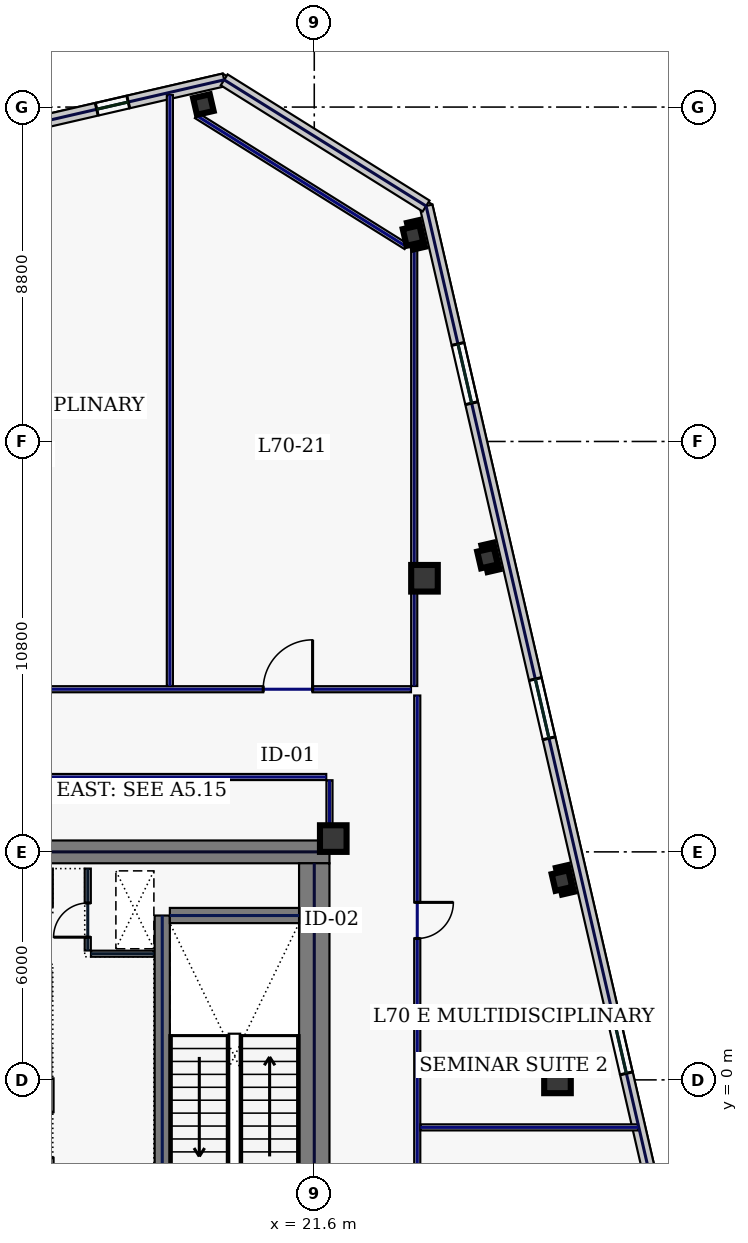
"""IFC4 building model, lengths in metres.
Left out: names, types, materials, properties, quantities, classifications, styles, units other than length and angle.
Written with IfcOpenShell. Run it as: python <this file> out.ifc"""

import sys

from ifc_helpers import new_model, si_unit, direction, frame, frame_2d, origin, origin_2d, place, context, subcontext, project, spatial, rectangle, hollow_rectangle, extrude, element, fill, save


model = new_model("IFC4")
c1 = context("Model", 3, precision=1e-05, world=origin(), true_north=direction((0.0, 1.0)))
c2 = subcontext(c1, "Body", "Model", "MODEL_VIEW")
j1 = project(units=[si_unit("LENGTHUNIT", "METRE"), si_unit("PLANEANGLEUNIT", "RADIAN")], contexts=[c1])
p1 = place(None, origin())
s1 = spatial("IfcSite", under=j1, at=p1, CompositionType="ELEMENT")
p2 = place(p1, origin())
s2 = spatial("IfcBuilding", under=s1, at=p2, CompositionType="ELEMENT")
p3 = place(p2, frame((0.0, 0.0, 301.0)))
s3 = spatial("IfcBuildingStorey", under=s2, at=p3, CompositionType="ELEMENT", Elevation=301.0)
p4 = place(p3, frame((10.5, 6.0, 0.0), z_axis=(0.0, 0.0, 1.0), x_axis=(1.0, 0.0, 0.0)))
e1 = element("IfcWall", 1, at=p4, inside=s3, PredefinedType="SHEAR", context=c2, shape_type="SweptSolid", body=[
    extrude(rectangle(XDim=11.5, YDim=0.6, at=frame_2d((5.75, 0.0))), origin(), (0.0, 0.0, 1.0), 3.74),
])
p5 = place(p3, frame((21.6, -5.7, 0.0), z_axis=(0.0, 0.0, 1.0), x_axis=(0.0, 1.0, 0.0)))
e2 = element("IfcWall", 2, at=p5, inside=s3, PredefinedType="SHEAR", context=c2, shape_type="SweptSolid", body=[
    extrude(rectangle(XDim=11.4, YDim=0.8, at=frame_2d((5.7, 0.0))), origin(), (0.0, 0.0, 1.0), 3.74),
])
p6 = place(p3, frame((17.6, -4.325, 0.0), z_axis=(0.0, 0.0, 1.0), x_axis=(0.0, 1.0, 0.0)))
e3 = element("IfcWall", 3, at=p6, inside=s3, PredefinedType="SHEAR", context=c2, shape_type="SweptSolid", body=[
    extrude(rectangle(XDim=8.65, YDim=0.4, at=frame_2d((4.325, 0.0))), origin(), (0.0, 0.0, 1.0), 3.74),
])
p7 = place(p6, frame((0.25, 0.0, 0.0)))
e4 = element("IfcOpeningElement", 4, at=p7, cuts=e3, PredefinedType="OPENING", context=c2, shape_type="SweptSolid", body=[
    extrude(rectangle(XDim=1.1, YDim=2.2, at=frame_2d((0.55, 1.1))), frame((0.0, 0.21, 0.0), z_axis=(0.0, -1.0, 0.0), x_axis=(1.0, 0.0, 0.0)), (0.0, 0.0, 1.0), 0.42),
])
p8 = place(p3, frame((17.8, 4.325, 0.0), z_axis=(0.0, 0.0, 1.0), x_axis=(1.0, 0.0, 0.0)))
e5 = element("IfcWall", 5, at=p8, inside=s3, PredefinedType="SHEAR", context=c2, shape_type="SweptSolid", body=[
    extrude(rectangle(XDim=3.4, YDim=0.4, at=frame_2d((1.7, 0.0))), origin(), (0.0, 0.0, 1.0), 3.74),
])
for number, where, z_axis, x_axis in (
    (6, (22.1, 6.35, 0.0), (0.0, 0.0, 1.0), (1.0, 0.0, 0.0)),
    (7, (24.5, 13.2, 0.0), (0.0, 0.0, 1.0), (1.0, 0.0, 0.0)),
    (8, (28.0, 0.0, 0.0), (0.0, 0.0, 1.0), (1.0, 0.0, 0.0)),
):
    element("IfcColumn", number, at=place(p3, frame(where, z_axis=z_axis, x_axis=x_axis)), inside=s3, PredefinedType="COLUMN", context=c2, shape_type="SweptSolid", body=[
        extrude(hollow_rectangle(XDim=0.7, YDim=0.7, WallThickness=0.032, at=origin_2d()), origin(), (0.0, 0.0, 1.0), 3.74),
    ])
for number, where, z_axis, x_axis in (
    (9, (18.682, 25.666, 0.0), (0.0, 0.0, 1.0), (0.974, 0.225, 0.0)),
    (10, (28.117, 5.246, 0.0), (0.0, 0.0, 1.0), (0.974, 0.225, 0.0)),
    (11, (26.158, 13.732, 0.0), (0.0, 0.0, 1.0), (0.974, 0.225, 0.0)),
    (12, (24.198, 22.219, 0.0), (0.0, 0.0, 1.0), (0.974, 0.225, 0.0)),
):
    element("IfcColumn", number, at=place(p3, frame(where, z_axis=z_axis, x_axis=x_axis)), inside=s3, PredefinedType="COLUMN", context=c2, shape_type="SweptSolid", body=[
        extrude(hollow_rectangle(XDim=0.45, YDim=0.45, WallThickness=0.022, at=origin_2d()), origin(), (0.0, 0.0, 1.0), 3.74),
    ])
p9 = place(p3, frame((19.229, 26.316, 0.0), z_axis=(0.0, 0.0, 1.0), x_axis=(-0.974372473594, -0.224940620392, 0.0)))
e13 = element("IfcWall", 13, at=p9, inside=s3, PredefinedType="STANDARD", context=c2, shape_type="SweptSolid", body=[
    extrude(rectangle(XDim=17.366, YDim=0.34, at=frame_2d((8.683, 0.0))), origin(), (0.0, 0.0, 1.0), 3.74),
])
p10 = place(p9, frame((13.187, 0.0, 1.0)))
e14 = element("IfcOpeningElement", 14, at=p10, cuts=e13, PredefinedType="OPENING", context=c2, shape_type="SweptSolid", body=[
    extrude(rectangle(XDim=1.4, YDim=1.85, at=frame_2d((0.7, 0.925))), frame((0.0, 0.18, 0.0), z_axis=(0.0, -1.0, 0.0), x_axis=(1.0, 0.0, 0.0)), (0.0, 0.0, 1.0), 0.36),
])
p11 = place(p9, frame((9.676, 0.0, 1.0)))
e15 = element("IfcOpeningElement", 15, at=p11, cuts=e13, PredefinedType="OPENING", context=c2, shape_type="SweptSolid", body=[
    extrude(rectangle(XDim=1.4, YDim=1.85, at=frame_2d((0.7, 0.925))), frame((0.0, 0.18, 0.0), z_axis=(0.0, -1.0, 0.0), x_axis=(1.0, 0.0, 0.0)), (0.0, 0.0, 1.0), 0.36),
])
p12 = place(p9, frame((5.553, 0.0, 1.0)))
e16 = element("IfcOpeningElement", 16, at=p12, cuts=e13, PredefinedType="OPENING", context=c2, shape_type="SweptSolid", body=[
    extrude(rectangle(XDim=1.4, YDim=1.85, at=frame_2d((0.7, 0.925))), frame((0.0, 0.18, 0.0), z_axis=(0.0, -1.0, 0.0), x_axis=(1.0, 0.0, 0.0)), (0.0, 0.0, 1.0), 0.36),
])
p13 = place(p9, frame((2.591, 0.0, 1.0)))
e17 = element("IfcOpeningElement", 17, at=p13, cuts=e13, PredefinedType="OPENING", context=c2, shape_type="SweptSolid", body=[
    extrude(rectangle(XDim=0.85, YDim=1.85, at=frame_2d((0.425, 0.925))), frame((0.0, 0.18, 0.0), z_axis=(0.0, -1.0, 0.0), x_axis=(1.0, 0.0, 0.0)), (0.0, 0.0, 1.0), 0.36),
])
p14 = place(p3, frame((32.686, -12.276, 0.0), z_axis=(0.0, 0.0, 1.0), x_axis=(-0.224953091034, 0.974369594576, 0.0)))
e18 = element("IfcWall", 18, at=p14, inside=s3, PredefinedType="STANDARD", context=c2, shape_type="SweptSolid", body=[
    extrude(rectangle(XDim=36.2, YDim=0.34, at=frame_2d((18.1, 0.0))), origin(), (0.0, 0.0, 1.0), 3.74),
])
p15 = place(p14, frame((3.725, 0.0, 0.58)))
e19 = element("IfcOpeningElement", 19, at=p15, cuts=e18, PredefinedType="OPENING", context=c2, shape_type="SweptSolid", body=[
    extrude(rectangle(XDim=1.6, YDim=2.3, at=frame_2d((0.8, 1.15))), frame((0.0, 0.18, 0.0), z_axis=(0.0, -1.0, 0.0), x_axis=(1.0, 0.0, 0.0)), (0.0, 0.0, 1.0), 0.36),
])
p16 = place(p14, frame((12.775, 0.0, 0.58)))
e20 = element("IfcOpeningElement", 20, at=p16, cuts=e18, PredefinedType="OPENING", context=c2, shape_type="SweptSolid", body=[
    extrude(rectangle(XDim=1.6, YDim=2.3, at=frame_2d((0.8, 1.15))), frame((0.0, 0.18, 0.0), z_axis=(0.0, -1.0, 0.0), x_axis=(1.0, 0.0, 0.0)), (0.0, 0.0, 1.0), 0.36),
])
p17 = place(p14, frame((21.825, 0.0, 0.58)))
e21 = element("IfcOpeningElement", 21, at=p17, cuts=e18, PredefinedType="OPENING", context=c2, shape_type="SweptSolid", body=[
    extrude(rectangle(XDim=1.6, YDim=2.3, at=frame_2d((0.8, 1.15))), frame((0.0, 0.18, 0.0), z_axis=(0.0, -1.0, 0.0), x_axis=(1.0, 0.0, 0.0)), (0.0, 0.0, 1.0), 0.36),
])
p18 = place(p14, frame((30.875, 0.0, 0.58)))
e22 = element("IfcOpeningElement", 22, at=p18, cuts=e18, PredefinedType="OPENING", context=c2, shape_type="SweptSolid", body=[
    extrude(rectangle(XDim=1.6, YDim=2.3, at=frame_2d((0.8, 1.15))), frame((0.0, 0.18, 0.0), z_axis=(0.0, -1.0, 0.0), x_axis=(1.0, 0.0, 0.0)), (0.0, 0.0, 1.0), 0.36),
])
p19 = place(p3, frame((24.542, 22.996, 0.0), z_axis=(0.0, 0.0, 1.0), x_axis=(-0.848055220921, 0.529907862057, 0.0)))
e23 = element("IfcWall", 23, at=p19, inside=s3, PredefinedType="STANDARD", context=c2, shape_type="SweptSolid", body=[
    extrude(rectangle(XDim=6.265, YDim=0.34, at=frame_2d((3.132, 0.0))), origin(), (0.0, 0.0, 1.0), 3.74),
])
p20 = place(p3, frame((15.64, 3.405, 0.0), z_axis=(0.0, 0.0, 1.0), x_axis=(0.0, 1.0, 0.0)))
e24 = element("IfcWall", 24, at=p20, inside=s3, PredefinedType="PARTITIONING", context=c2, shape_type="SweptSolid", body=[
    extrude(rectangle(XDim=2.155, YDim=0.16, at=frame_2d((1.078, 0.0))), origin(), (0.0, 0.0, 1.0), 3.74),
])
p21 = place(p20, frame((0.35, 0.0, 0.0)))
e25 = element("IfcOpeningElement", 25, at=p21, cuts=e24, PredefinedType="OPENING", context=c2, shape_type="SweptSolid", body=[
    extrude(rectangle(XDim=0.9, YDim=2.2, at=frame_2d((0.45, 1.1))), frame((0.0, 0.09, 0.0), z_axis=(0.0, -1.0, 0.0), x_axis=(1.0, 0.0, 0.0)), (0.0, 0.0, 1.0), 0.18),
])
p22 = place(p3, frame((15.725, 3.32, 0.0), z_axis=(0.0, 0.0, 1.0), x_axis=(1.0, 0.0, 0.0)))
e26 = element("IfcWall", 26, at=p22, inside=s3, PredefinedType="PARTITIONING", context=c2, shape_type="SweptSolid", body=[
    extrude(rectangle(XDim=1.655, YDim=0.16, at=frame_2d((0.827, 0.0))), origin(), (0.0, 0.0, 1.0), 3.74),
])
p23 = place(p3, frame((14.64, -5.56, 0.0), z_axis=(0.0, 0.0, 1.0), x_axis=(0.0, 1.0, 0.0)))
e27 = element("IfcWall", 27, at=p23, inside=s3, PredefinedType="SOLIDWALL", context=c2, shape_type="SweptSolid", body=[
    extrude(rectangle(XDim=5.6, YDim=0.2, at=frame_2d((2.8, 0.0))), origin(), (0.0, 0.0, 1.0), 3.74),
])
p24 = place(p23, frame((3.51, 0.0, 0.0)))
e28 = element("IfcOpeningElement", 28, at=p24, cuts=e27, PredefinedType="OPENING", context=c2, shape_type="SweptSolid", body=[
    extrude(rectangle(XDim=1.2, YDim=2.2, at=frame_2d((0.6, 1.1))), frame((0.0, 0.11, 0.0), z_axis=(0.0, -1.0, 0.0), x_axis=(1.0, 0.0, 0.0)), (0.0, 0.0, 1.0), 0.22),
])
p25 = place(p3, frame((24.018, 21.931, 0.0), z_axis=(0.0, 0.0, 1.0), x_axis=(-0.848051009591, 0.529914601736, 0.0)))
e29 = element("IfcWall", 29, at=p25, inside=s3, PredefinedType="PARTITIONING", context=c2, shape_type="SweptSolid", body=[
    extrude(rectangle(XDim=6.505, YDim=0.16, at=frame_2d((3.253, 0.0))), origin(), (0.0, 0.0, 1.0), 3.74),
])
p26 = place(p3, frame((-24.145, 10.28, 0.0), z_axis=(0.0, 0.0, 1.0), x_axis=(1.0, 0.0, 0.0)))
e30 = element("IfcWall", 30, at=p26, inside=s3, PredefinedType="PARTITIONING", context=c2, shape_type="SweptSolid", body=[
    extrude(rectangle(XDim=48.29, YDim=0.16, at=frame_2d((24.145, 0.0))), origin(), (0.0, 0.0, 1.0), 3.74),
])
p27 = place(p26, frame((2.044, 0.0, 0.0)))
e31 = element("IfcOpeningElement", 31, at=p27, cuts=e30, PredefinedType="OPENING", context=c2, shape_type="SweptSolid", body=[
    extrude(rectangle(XDim=0.95, YDim=2.2, at=frame_2d((0.475, 1.1))), frame((0.0, 0.09, 0.0), z_axis=(0.0, -1.0, 0.0), x_axis=(1.0, 0.0, 0.0)), (0.0, 0.0, 1.0), 0.18),
])
p28 = place(p26, frame((6.885, 0.0, 0.0)))
e32 = element("IfcOpeningElement", 32, at=p28, cuts=e30, PredefinedType="OPENING", context=c2, shape_type="SweptSolid", body=[
    extrude(rectangle(XDim=0.95, YDim=2.2, at=frame_2d((0.475, 1.1))), frame((0.0, 0.09, 0.0), z_axis=(0.0, -1.0, 0.0), x_axis=(1.0, 0.0, 0.0)), (0.0, 0.0, 1.0), 0.18),
])
p29 = place(p26, frame((14.8, 0.0, 0.0)))
e33 = element("IfcOpeningElement", 33, at=p29, cuts=e30, PredefinedType="OPENING", context=c2, shape_type="SweptSolid", body=[
    extrude(rectangle(XDim=1.3, YDim=2.2, at=frame_2d((0.65, 1.1))), frame((0.0, 0.09, 0.0), z_axis=(0.0, -1.0, 0.0), x_axis=(1.0, 0.0, 0.0)), (0.0, 0.0, 1.0), 0.18),
])
p30 = place(p26, frame((25.58, 0.0, 0.0)))
e34 = element("IfcOpeningElement", 34, at=p30, cuts=e30, PredefinedType="OPENING", context=c2, shape_type="SweptSolid", body=[
    extrude(rectangle(XDim=1.3, YDim=2.2, at=frame_2d((0.65, 1.1))), frame((0.0, 0.09, 0.0), z_axis=(0.0, -1.0, 0.0), x_axis=(1.0, 0.0, 0.0)), (0.0, 0.0, 1.0), 0.18),
])
p31 = place(p26, frame((36.355, 0.0, 0.0)))
e35 = element("IfcOpeningElement", 35, at=p31, cuts=e30, PredefinedType="OPENING", context=c2, shape_type="SweptSolid", body=[
    extrude(rectangle(XDim=0.95, YDim=2.2, at=frame_2d((0.475, 1.1))), frame((0.0, 0.09, 0.0), z_axis=(0.0, -1.0, 0.0), x_axis=(1.0, 0.0, 0.0)), (0.0, 0.0, 1.0), 0.18),
])
p32 = place(p26, frame((44.401, 0.0, 0.0)))
e36 = element("IfcOpeningElement", 36, at=p32, cuts=e30, PredefinedType="OPENING", context=c2, shape_type="SweptSolid", body=[
    extrude(rectangle(XDim=1.3, YDim=2.2, at=frame_2d((0.65, 1.1))), frame((0.0, 0.09, 0.0), z_axis=(0.0, -1.0, 0.0), x_axis=(1.0, 0.0, 0.0)), (0.0, 0.0, 1.0), 0.18),
])
p33 = place(p3, frame((24.31, 10.115, 0.0), z_axis=(0.0, 0.0, 1.0), x_axis=(0.0, -1.0, 0.0)))
e37 = element("IfcWall", 37, at=p33, inside=s3, PredefinedType="PARTITIONING", context=c2, shape_type="SweptSolid", body=[
    extrude(rectangle(XDim=20.13, YDim=0.16, at=frame_2d((10.065, 0.0))), origin(), (0.0, 0.0, 1.0), 3.74),
])
p34 = place(p33, frame((15.206, 0.0, 0.0)))
e38 = element("IfcOpeningElement", 38, at=p34, cuts=e37, PredefinedType="OPENING", context=c2, shape_type="SweptSolid", body=[
    extrude(rectangle(XDim=0.95, YDim=2.2, at=frame_2d((0.475, 1.1))), frame((0.0, 0.09, 0.0), z_axis=(0.0, -1.0, 0.0), x_axis=(1.0, 0.0, 0.0)), (0.0, 0.0, 1.0), 0.18),
])
p35 = place(p33, frame((5.444, 0.0, 0.0)))
e39 = element("IfcOpeningElement", 39, at=p35, cuts=e37, PredefinedType="OPENING", context=c2, shape_type="SweptSolid", body=[
    extrude(rectangle(XDim=0.95, YDim=2.2, at=frame_2d((0.475, 1.1))), frame((0.0, 0.09, 0.0), z_axis=(0.0, -1.0, 0.0), x_axis=(1.0, 0.0, 0.0)), (0.0, 0.0, 1.0), 0.18),
])
p36 = place(p3, frame((21.915, 7.97, 0.0), z_axis=(0.0, 0.0, 1.0), x_axis=(-1.0, 0.0, 0.0)))
e40 = element("IfcWall", 40, at=p36, inside=s3, PredefinedType="PARTITIONING", context=c2, shape_type="SweptSolid", body=[
    extrude(rectangle(XDim=11.2, YDim=0.16, at=frame_2d((5.6, 0.0))), origin(), (0.0, 0.0, 1.0), 3.74),
])
p37 = place(p3, frame((22.0, 6.42, 0.0), z_axis=(0.0, 0.0, 1.0), x_axis=(0.0, 1.0, 0.0)))
e41 = element("IfcWall", 41, at=p37, inside=s3, PredefinedType="PARTITIONING", context=c2, shape_type="SweptSolid", body=[
    extrude(rectangle(XDim=1.465, YDim=0.16, at=frame_2d((0.732, 0.0))), origin(), (0.0, 0.0, 1.0), 3.74),
])
p38 = place(p3, frame((24.23, 10.365, 0.0), z_axis=(0.0, 0.0, 1.0), x_axis=(0.0, 1.0, 0.0)))
e42 = element("IfcWall", 42, at=p38, inside=s3, PredefinedType="PARTITIONING", context=c2, shape_type="SweptSolid", body=[
    extrude(rectangle(XDim=12.206, YDim=0.16, at=frame_2d((6.103, 0.0))), origin(), (0.0, 0.0, 1.0), 3.185),
])
p39 = place(p3, frame((17.8, 10.365, 0.0), z_axis=(0.0, 0.0, 1.0), x_axis=(0.0, 1.0, 0.0)))
e43 = element("IfcWall", 43, at=p39, inside=s3, PredefinedType="PARTITIONING", context=c2, shape_type="SweptSolid", body=[
    extrude(rectangle(XDim=15.549, YDim=0.16, at=frame_2d((7.775, 0.0))), origin(), (0.0, 0.0, 1.0), 3.74),
])
p40 = place(p3, frame((24.395, -1.25, 0.0), z_axis=(0.0, 0.0, 1.0), x_axis=(1.0, 0.0, 0.0)))
e44 = element("IfcWall", 44, at=p40, inside=s3, PredefinedType="PARTITIONING", context=c2, shape_type="SweptSolid", body=[
    extrude(rectangle(XDim=5.725, YDim=0.16, at=frame_2d((2.862, 0.0))), origin(), (0.0, 0.0, 1.0), 3.74),
])
p41 = place(p13, origin())
e45 = element("IfcWindow", 45, at=p41, inside=s3, PartitioningType="SINGLE_PANEL", PredefinedType="WINDOW", context=c2, shape_type="SweptSolid", body=[
    extrude(rectangle(XDim=0.85, YDim=1.85, at=frame_2d((0.425, 0.925))), frame((0.0, 0.03, 0.0), z_axis=(0.0, -1.0, 0.0), x_axis=(1.0, 0.0, 0.0)), (0.0, 0.0, 1.0), 0.06),
])
fill(e17, e45)
p42 = place(p16, origin())
e46 = element("IfcWindow", 46, at=p42, inside=s3, PartitioningType="SINGLE_PANEL", PredefinedType="WINDOW", context=c2, shape_type="SweptSolid", body=[
    extrude(rectangle(XDim=1.6, YDim=2.3, at=frame_2d((0.8, 1.15))), frame((0.0, 0.03, 0.0), z_axis=(0.0, -1.0, 0.0), x_axis=(1.0, 0.0, 0.0)), (0.0, 0.0, 1.0), 0.06),
])
fill(e20, e46)
p43 = place(p17, origin())
e47 = element("IfcWindow", 47, at=p43, inside=s3, PartitioningType="SINGLE_PANEL", PredefinedType="WINDOW", context=c2, shape_type="SweptSolid", body=[
    extrude(rectangle(XDim=1.6, YDim=2.3, at=frame_2d((0.8, 1.15))), frame((0.0, 0.03, 0.0), z_axis=(0.0, -1.0, 0.0), x_axis=(1.0, 0.0, 0.0)), (0.0, 0.0, 1.0), 0.06),
])
fill(e21, e47)
p44 = place(p18, origin())
e48 = element("IfcWindow", 48, at=p44, inside=s3, PartitioningType="SINGLE_PANEL", PredefinedType="WINDOW", context=c2, shape_type="SweptSolid", body=[
    extrude(rectangle(XDim=1.6, YDim=2.3, at=frame_2d((0.8, 1.15))), frame((0.0, 0.03, 0.0), z_axis=(0.0, -1.0, 0.0), x_axis=(1.0, 0.0, 0.0)), (0.0, 0.0, 1.0), 0.06),
])
fill(e22, e48)
p45 = place(p21, origin())
e49 = element("IfcDoor", 49, at=p45, inside=s3, OperationType="SINGLE_SWING_LEFT", PredefinedType="DOOR", context=c2, shape_type="SweptSolid", body=[
    extrude(rectangle(XDim=0.9, YDim=2.2, at=frame_2d((0.45, 1.1))), frame((0.0, 0.025, 0.0), z_axis=(0.0, -1.0, 0.0), x_axis=(1.0, 0.0, 0.0)), (0.0, 0.0, 1.0), 0.05),
])
fill(e25, e49)
p46 = place(p32, origin())
e50 = element("IfcDoor", 50, at=p46, inside=s3, OperationType="SINGLE_SWING_RIGHT", PredefinedType="DOOR", context=c2, shape_type="SweptSolid", body=[
    extrude(rectangle(XDim=1.3, YDim=2.2, at=frame_2d((0.65, 1.1))), frame((0.0, 0.025, 0.0), z_axis=(0.0, -1.0, 0.0), x_axis=(1.0, 0.0, 0.0)), (0.0, 0.0, 1.0), 0.05),
])
fill(e36, e50)
p47 = place(p35, origin())
e51 = element("IfcDoor", 51, at=p47, inside=s3, OperationType="SINGLE_SWING_LEFT", PredefinedType="DOOR", context=c2, shape_type="SweptSolid", body=[
    extrude(rectangle(XDim=0.95, YDim=2.2, at=frame_2d((0.475, 1.1))), frame((0.0, 0.025, 0.0), z_axis=(0.0, -1.0, 0.0), x_axis=(1.0, 0.0, 0.0)), (0.0, 0.0, 1.0), 0.05),
])
fill(e39, e51)
save(model, sys.argv[1])
